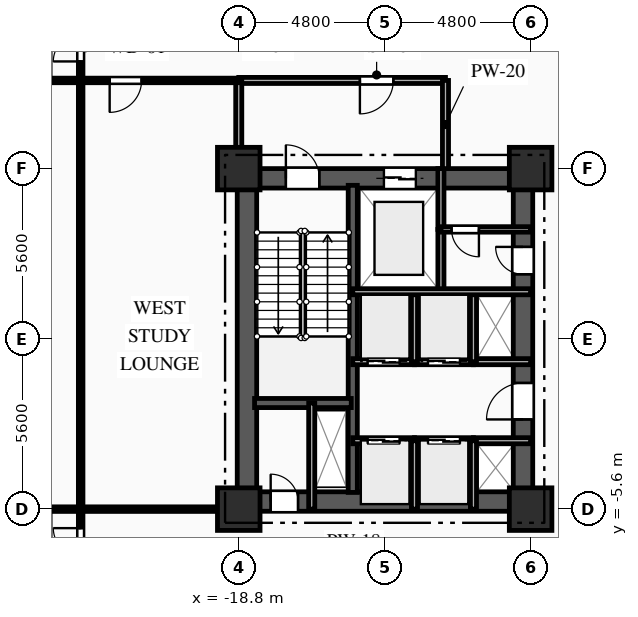
"""IFC4 building model, lengths in metres.
Left out: names, types, materials, properties, quantities, classifications, styles, units other than length and angle.
Written with IfcOpenShell. Run it as: python <this file> out.ifc"""

import sys

from ifc_helpers import new_model, si_unit, direction, frame, frame_2d, origin, origin_2d, place, context, subcontext, project, spatial, rectangle, extrude, element, fill, save


model = new_model("IFC4")
c1 = context("Model", 3, precision=1e-05, world=origin(), true_north=direction((0.0, 1.0)))
c2 = subcontext(c1, "Body", "Model", "MODEL_VIEW")
j1 = project(units=[si_unit("LENGTHUNIT", "METRE"), si_unit("PLANEANGLEUNIT", "RADIAN")], contexts=[c1])
p1 = place(None, origin())
s1 = spatial("IfcSite", under=j1, at=p1, CompositionType="ELEMENT")
p2 = place(p1, origin())
s2 = spatial("IfcBuilding", under=s1, at=p2, CompositionType="ELEMENT")
p3 = place(p2, frame((0.0, 0.0, 18.0)))
s3 = spatial("IfcBuildingStorey", under=s2, at=p3, CompositionType="ELEMENT", Elevation=18.0)
for number, where, z_axis, x_axis in (
    (1, (-18.8, -5.6, 0.0), (0.0, 0.0, 1.0), (1.0, 0.0, 0.0)),
    (2, (-18.8, 5.6, 0.0), (0.0, 0.0, 1.0), (1.0, 0.0, 0.0)),
    (3, (-9.2, -5.6, 0.0), (0.0, 0.0, 1.0), (1.0, 0.0, 0.0)),
    (4, (-9.2, 5.6, 0.0), (0.0, 0.0, 1.0), (1.0, 0.0, 0.0)),
):
    element("IfcColumn", number, at=place(p3, frame(where, z_axis=z_axis, x_axis=x_axis)), inside=s3, PredefinedType="COLUMN", context=c2, shape_type="SweptSolid", body=[
        extrude(rectangle(XDim=1.4, YDim=1.4, at=origin_2d()), origin(), (0.0, 0.0, 1.0), 4.5),
    ])
p4 = place(p3, frame((-18.8, 5.28, 0.0), z_axis=(0.0, 0.0, 1.0), x_axis=(1.0, 0.0, 0.0)))
e5 = element("IfcWall", 5, at=p4, inside=s3, PredefinedType="SHEAR", context=c2, shape_type="SweptSolid", body=[
    extrude(rectangle(XDim=9.6, YDim=0.64, at=frame_2d((4.8, 0.0))), origin(), (0.0, 0.0, 1.0), 4.17),
])
p5 = place(p4, frame((1.55, 0.0, 0.0)))
e6 = element("IfcOpeningElement", 6, at=p5, cuts=e5, PredefinedType="OPENING", context=c2, shape_type="SweptSolid", body=[
    extrude(rectangle(XDim=1.1, YDim=2.15, at=frame_2d((0.55, 1.075))), frame((0.0, 0.33, 0.0), z_axis=(0.0, -1.0, 0.0), x_axis=(1.0, 0.0, 0.0)), (0.0, 0.0, 1.0), 0.66),
])
p6 = place(p4, frame((4.775, 0.0, 0.0)))
e7 = element("IfcOpeningElement", 7, at=p6, cuts=e5, PredefinedType="OPENING", context=c2, shape_type="SweptSolid", body=[
    extrude(rectangle(XDim=1.05, YDim=2.1, at=frame_2d((0.525, 1.05))), frame((0.0, 0.33, 0.0), z_axis=(0.0, -1.0, 0.0), x_axis=(1.0, 0.0, 0.0)), (0.0, 0.0, 1.0), 0.66),
])
p7 = place(p3, frame((-18.8, -5.35, 0.0), z_axis=(0.0, 0.0, 1.0), x_axis=(1.0, 0.0, 0.0)))
e8 = element("IfcWall", 8, at=p7, inside=s3, PredefinedType="SHEAR", context=c2, shape_type="SweptSolid", body=[
    extrude(rectangle(XDim=9.6, YDim=0.64, at=frame_2d((4.8, 0.0))), origin(), (0.0, 0.0, 1.0), 4.17),
])
p8 = place(p7, frame((1.05, 0.0, 0.0)))
e9 = element("IfcOpeningElement", 9, at=p8, cuts=e8, PredefinedType="OPENING", context=c2, shape_type="SweptSolid", body=[
    extrude(rectangle(XDim=0.9, YDim=2.1, at=frame_2d((0.45, 1.05))), frame((0.0, 0.33, 0.0), z_axis=(0.0, -1.0, 0.0), x_axis=(1.0, 0.0, 0.0)), (0.0, 0.0, 1.0), 0.66),
])
p9 = place(p3, frame((-18.53, -5.05, 0.0), z_axis=(0.0, 0.0, 1.0), x_axis=(0.0, 1.0, 0.0)))
e10 = element("IfcWall", 10, at=p9, inside=s3, PredefinedType="SHEAR", context=c2, shape_type="SweptSolid", body=[
    extrude(rectangle(XDim=10.1, YDim=0.64, at=frame_2d((5.05, 0.0))), origin(), (0.0, 0.0, 1.0), 4.17),
])
p10 = place(p3, frame((-9.45, -5.05, 0.0), z_axis=(0.0, 0.0, 1.0), x_axis=(0.0, 1.0, 0.0)))
e11 = element("IfcWall", 11, at=p10, inside=s3, PredefinedType="SHEAR", context=c2, shape_type="SweptSolid", body=[
    extrude(rectangle(XDim=10.1, YDim=0.64, at=frame_2d((5.05, 0.0))), origin(), (0.0, 0.0, 1.0), 4.17),
])
p11 = place(p10, frame((7.175, 0.0, 0.0)))
e12 = element("IfcOpeningElement", 12, at=p11, cuts=e11, PredefinedType="OPENING", context=c2, shape_type="SweptSolid", body=[
    extrude(rectangle(XDim=0.9, YDim=2.1, at=frame_2d((0.45, 1.05))), frame((0.0, 0.33, 0.0), z_axis=(0.0, -1.0, 0.0), x_axis=(1.0, 0.0, 0.0)), (0.0, 0.0, 1.0), 0.66),
])
p12 = place(p10, frame((2.4, 0.0, 0.0)))
e13 = element("IfcOpeningElement", 13, at=p12, cuts=e11, PredefinedType="OPENING", context=c2, shape_type="SweptSolid", body=[
    extrude(rectangle(XDim=1.2, YDim=2.15, at=frame_2d((0.6, 1.075))), frame((0.0, 0.33, 0.0), z_axis=(0.0, -1.0, 0.0), x_axis=(1.0, 0.0, 0.0)), (0.0, 0.0, 1.0), 0.66),
])
p13 = place(p3, frame((-15.05, -5.05, 0.0), z_axis=(0.0, 0.0, 1.0), x_axis=(0.0, 1.0, 0.0)))
e14 = element("IfcWall", 14, at=p13, inside=s3, PredefinedType="SHEAR", context=c2, shape_type="SweptSolid", body=[
    extrude(rectangle(XDim=10.1, YDim=0.3, at=frame_2d((5.05, 0.0))), origin(), (0.0, 0.0, 1.0), 4.17),
])
p14 = place(p3, frame((-18.28, -2.11, 0.0), z_axis=(0.0, 0.0, 1.0), x_axis=(1.0, 0.0, 0.0)))
e15 = element("IfcWall", 15, at=p14, inside=s3, PredefinedType="SHEAR", context=c2, shape_type="SweptSolid", body=[
    extrude(rectangle(XDim=3.18, YDim=0.3, at=frame_2d((1.59, 0.0))), origin(), (0.0, 0.0, 1.0), 4.17),
])
p15 = place(p3, frame((-16.4, -5.6, 0.0), z_axis=(0.0, 0.0, 1.0), x_axis=(0.0, 1.0, 0.0)))
e16 = element("IfcWall", 16, at=p15, inside=s3, PredefinedType="PARTITIONING", context=c2, shape_type="SweptSolid", body=[
    extrude(rectangle(XDim=3.49, YDim=0.2, at=frame_2d((1.745, 0.0))), origin(), (0.0, 0.0, 1.0), 4.17),
])
p16 = place(p3, frame((-12.15, 1.55, 0.0), z_axis=(0.0, 0.0, 1.0), x_axis=(0.0, 1.0, 0.0)))
e17 = element("IfcWall", 17, at=p16, inside=s3, PredefinedType="PARTITIONING", context=c2, shape_type="SweptSolid", body=[
    extrude(rectangle(XDim=2.05, YDim=0.2, at=frame_2d((1.025, 0.0))), origin(), (0.0, 0.0, 1.0), 4.17),
])
p17 = place(p3, frame((-12.15, 3.6, 0.0), z_axis=(0.0, 0.0, 1.0), x_axis=(0.0, 1.0, 0.0)))
e18 = element("IfcWall", 18, at=p17, inside=s3, PredefinedType="PARTITIONING", context=c2, shape_type="SweptSolid", body=[
    extrude(rectangle(XDim=2.0, YDim=0.2, at=frame_2d((1.0, 0.0))), origin(), (0.0, 0.0, 1.0), 4.17),
])
p18 = place(p3, frame((-12.0, 8.5, 0.0), z_axis=(0.0, 0.0, 1.0), x_axis=(-1.0, 0.0, 0.0)))
e19 = element("IfcWall", 19, at=p18, inside=s3, PredefinedType="PARTITIONING", context=c2, shape_type="SweptSolid", body=[
    extrude(rectangle(XDim=6.8, YDim=0.2, at=frame_2d((3.4, 0.0))), origin(), (0.0, 0.0, 1.0), 4.17),
])
p19 = place(p18, frame((1.715, 0.0, 0.0)))
e20 = element("IfcOpeningElement", 20, at=p19, cuts=e19, PredefinedType="OPENING", context=c2, shape_type="SweptSolid", body=[
    extrude(rectangle(XDim=1.1, YDim=2.15, at=frame_2d((0.55, 1.075))), frame((0.0, 0.11, 0.0), z_axis=(0.0, -1.0, 0.0), x_axis=(1.0, 0.0, 0.0)), (0.0, 0.0, 1.0), 0.22),
])
p20 = place(p3, frame((-12.0, 5.6, 0.0), z_axis=(0.0, 0.0, 1.0), x_axis=(0.0, 1.0, 0.0)))
e21 = element("IfcWall", 21, at=p20, inside=s3, PredefinedType="PARTITIONING", context=c2, shape_type="SweptSolid", body=[
    extrude(rectangle(XDim=2.9, YDim=0.2, at=frame_2d((1.45, 0.0))), origin(), (0.0, 0.0, 1.0), 4.17),
])
p21 = place(p3, frame((-18.8, 8.5, 0.0), z_axis=(0.0, 0.0, 1.0), x_axis=(0.0, -1.0, 0.0)))
e22 = element("IfcWall", 22, at=p21, inside=s3, PredefinedType="PARTITIONING", context=c2, shape_type="SweptSolid", body=[
    extrude(rectangle(XDim=2.9, YDim=0.2, at=frame_2d((1.45, 0.0))), origin(), (0.0, 0.0, 1.0), 3.655),
])
p22 = place(p3, frame((-9.2, 3.6, 0.0), z_axis=(0.0, 0.0, 1.0), x_axis=(-1.0, 0.0, 0.0)))
e23 = element("IfcWall", 23, at=p22, inside=s3, PredefinedType="PARTITIONING", context=c2, shape_type="SweptSolid", body=[
    extrude(rectangle(XDim=2.95, YDim=0.18, at=frame_2d((1.475, 0.0))), origin(), (0.0, 0.0, 1.0), 4.17),
])
p23 = place(p22, frame((1.7, 0.0, 0.0)))
e24 = element("IfcOpeningElement", 24, at=p23, cuts=e23, PredefinedType="OPENING", context=c2, shape_type="SweptSolid", body=[
    extrude(rectangle(XDim=0.9, YDim=2.1, at=frame_2d((0.45, 1.05))), frame((0.0, 0.1, 0.0), z_axis=(0.0, -1.0, 0.0), x_axis=(1.0, 0.0, 0.0)), (0.0, 0.0, 1.0), 0.2),
])
p24 = place(p3, frame((-15.05, -3.35, 0.0), z_axis=(0.0, 0.0, 1.0), x_axis=(1.0, 0.0, 0.0)))
e25 = element("IfcWall", 25, at=p24, inside=s3, PredefinedType="PARTITIONING", context=c2, shape_type="SweptSolid", body=[
    extrude(rectangle(XDim=2.03, YDim=0.2, at=frame_2d((1.015, 0.0))), origin(), (0.0, 0.0, 1.0), 4.17),
])
p25 = place(p24, frame((0.49, 0.0, 0.0)))
e26 = element("IfcOpeningElement", 26, at=p25, cuts=e25, PredefinedType="OPENING", context=c2, shape_type="SweptSolid", body=[
    extrude(rectangle(XDim=1.05, YDim=2.1, at=frame_2d((0.525, 1.05))), frame((0.0, 0.11, 0.0), z_axis=(0.0, -1.0, 0.0), x_axis=(1.0, 0.0, 0.0)), (0.0, 0.0, 1.0), 0.22),
])
p26 = place(p3, frame((-13.02, -3.35, 0.0), z_axis=(0.0, 0.0, 1.0), x_axis=(1.0, 0.0, 0.0)))
e27 = element("IfcWall", 27, at=p26, inside=s3, PredefinedType="PARTITIONING", context=c2, shape_type="SweptSolid", body=[
    extrude(rectangle(XDim=1.94, YDim=0.2, at=frame_2d((0.97, 0.0))), origin(), (0.0, 0.0, 1.0), 4.17),
])
p27 = place(p26, frame((0.445, 0.0, 0.0)))
e28 = element("IfcOpeningElement", 28, at=p27, cuts=e27, PredefinedType="OPENING", context=c2, shape_type="SweptSolid", body=[
    extrude(rectangle(XDim=1.05, YDim=2.1, at=frame_2d((0.525, 1.05))), frame((0.0, 0.11, 0.0), z_axis=(0.0, -1.0, 0.0), x_axis=(1.0, 0.0, 0.0)), (0.0, 0.0, 1.0), 0.22),
])
p28 = place(p3, frame((-11.08, -3.35, 0.0), z_axis=(0.0, 0.0, 1.0), x_axis=(1.0, 0.0, 0.0)))
e29 = element("IfcWall", 29, at=p28, inside=s3, PredefinedType="PARTITIONING", context=c2, shape_type="SweptSolid", body=[
    extrude(rectangle(XDim=1.88, YDim=0.2, at=frame_2d((0.94, 0.0))), origin(), (0.0, 0.0, 1.0), 3.885),
])
p29 = place(p3, frame((-13.02, -0.75, 0.0), z_axis=(0.0, 0.0, 1.0), x_axis=(-1.0, 0.0, 0.0)))
e30 = element("IfcWall", 30, at=p29, inside=s3, PredefinedType="PARTITIONING", context=c2, shape_type="SweptSolid", body=[
    extrude(rectangle(XDim=2.03, YDim=0.2, at=frame_2d((1.015, 0.0))), origin(), (0.0, 0.0, 1.0), 4.17),
])
p30 = place(p29, frame((0.49, 0.0, 0.0)))
e31 = element("IfcOpeningElement", 31, at=p30, cuts=e30, PredefinedType="OPENING", context=c2, shape_type="SweptSolid", body=[
    extrude(rectangle(XDim=1.05, YDim=2.1, at=frame_2d((0.525, 1.05))), frame((0.0, 0.11, 0.0), z_axis=(0.0, -1.0, 0.0), x_axis=(1.0, 0.0, 0.0)), (0.0, 0.0, 1.0), 0.22),
])
p31 = place(p3, frame((-11.08, -0.75, 0.0), z_axis=(0.0, 0.0, 1.0), x_axis=(-1.0, 0.0, 0.0)))
e32 = element("IfcWall", 32, at=p31, inside=s3, PredefinedType="PARTITIONING", context=c2, shape_type="SweptSolid", body=[
    extrude(rectangle(XDim=1.94, YDim=0.2, at=frame_2d((0.97, 0.0))), origin(), (0.0, 0.0, 1.0), 4.17),
])
p32 = place(p31, frame((0.445, 0.0, 0.0)))
e33 = element("IfcOpeningElement", 33, at=p32, cuts=e32, PredefinedType="OPENING", context=c2, shape_type="SweptSolid", body=[
    extrude(rectangle(XDim=1.05, YDim=2.1, at=frame_2d((0.525, 1.05))), frame((0.0, 0.11, 0.0), z_axis=(0.0, -1.0, 0.0), x_axis=(1.0, 0.0, 0.0)), (0.0, 0.0, 1.0), 0.22),
])
p33 = place(p3, frame((-9.2, -0.75, 0.0), z_axis=(0.0, 0.0, 1.0), x_axis=(-1.0, 0.0, 0.0)))
e34 = element("IfcWall", 34, at=p33, inside=s3, PredefinedType="PARTITIONING", context=c2, shape_type="SweptSolid", body=[
    extrude(rectangle(XDim=1.88, YDim=0.2, at=frame_2d((0.94, 0.0))), origin(), (0.0, 0.0, 1.0), 4.17),
])
for number, where, z_axis, x_axis in (
    (35, (-13.02, -5.6, 0.0), (0.0, 0.0, 1.0), (0.0, 1.0, 0.0)),
    (36, (-11.08, -5.6, 0.0), (0.0, 0.0, 1.0), (0.0, 1.0, 0.0)),
):
    element("IfcWall", number, at=place(p3, frame(where, z_axis=z_axis, x_axis=x_axis)), inside=s3, PredefinedType="PARTITIONING", context=c2, shape_type="SweptSolid", body=[
        extrude(rectangle(XDim=2.25, YDim=0.2, at=frame_2d((1.125, 0.0))), origin(), (0.0, 0.0, 1.0), 4.17),
    ])
for number, where, z_axis, x_axis in (
    (37, (-13.02, -0.75, 0.0), (0.0, 0.0, 1.0), (0.0, 1.0, 0.0)),
    (38, (-11.08, -0.75, 0.0), (0.0, 0.0, 1.0), (0.0, 1.0, 0.0)),
):
    element("IfcWall", number, at=place(p3, frame(where, z_axis=z_axis, x_axis=x_axis)), inside=s3, PredefinedType="PARTITIONING", context=c2, shape_type="SweptSolid", body=[
        extrude(rectangle(XDim=2.3, YDim=0.2, at=frame_2d((1.15, 0.0))), origin(), (0.0, 0.0, 1.0), 4.17),
    ])
p34 = place(p3, frame((-24.0, 8.5, 0.0), z_axis=(0.0, 0.0, 1.0), x_axis=(0.0, 1.0, 0.0)))
e39 = element("IfcWall", 39, at=p34, inside=s3, PredefinedType="PARTITIONING", context=c2, shape_type="SweptSolid", body=[
    extrude(rectangle(XDim=2.15, YDim=0.15, at=frame_2d((1.075, 0.0))), origin(), (0.0, 0.0, 1.0), 4.17),
])
p35 = place(p34, frame((0.625, 0.0, 0.0)))
e40 = element("IfcOpeningElement", 40, at=p35, cuts=e39, PredefinedType="OPENING", context=c2, shape_type="SweptSolid", body=[
    extrude(rectangle(XDim=0.9, YDim=2.1, at=frame_2d((0.45, 1.05))), frame((0.0, 0.085, 0.0), z_axis=(0.0, -1.0, 0.0), x_axis=(1.0, 0.0, 0.0)), (0.0, 0.0, 1.0), 0.17),
])
p36 = place(p3, frame((-18.8, 8.5, 0.0), z_axis=(0.0, 0.0, 1.0), x_axis=(-1.0, 0.0, 0.0)))
e41 = element("IfcWall", 41, at=p36, inside=s3, PredefinedType="PARTITIONING", context=c2, shape_type="SweptSolid", body=[
    extrude(rectangle(XDim=5.2, YDim=0.15, at=frame_2d((2.6, 0.0))), origin(), (0.0, 0.0, 1.0), 4.17),
])
p37 = place(p36, frame((3.196, 0.0, 0.0)))
e42 = element("IfcOpeningElement", 42, at=p37, cuts=e41, PredefinedType="OPENING", context=c2, shape_type="SweptSolid", body=[
    extrude(rectangle(XDim=1.05, YDim=2.15, at=frame_2d((0.525, 1.075))), frame((0.0, 0.085, 0.0), z_axis=(0.0, -1.0, 0.0), x_axis=(1.0, 0.0, 0.0)), (0.0, 0.0, 1.0), 0.17),
])
p38 = place(p3, frame((-24.0, -7.75, 0.0), z_axis=(0.0, 0.0, 1.0), x_axis=(0.0, 1.0, 0.0)))
e43 = element("IfcWall", 43, at=p38, inside=s3, PredefinedType="PARTITIONING", context=c2, shape_type="SweptSolid", body=[
    extrude(rectangle(XDim=2.15, YDim=0.15, at=frame_2d((1.075, 0.0))), origin(), (0.0, 0.0, 1.0), 4.17),
])
p39 = place(p38, frame((0.625, 0.0, 0.0)))
e44 = element("IfcOpeningElement", 44, at=p39, cuts=e43, PredefinedType="OPENING", context=c2, shape_type="SweptSolid", body=[
    extrude(rectangle(XDim=0.9, YDim=2.1, at=frame_2d((0.45, 1.05))), frame((0.0, 0.085, 0.0), z_axis=(0.0, -1.0, 0.0), x_axis=(1.0, 0.0, 0.0)), (0.0, 0.0, 1.0), 0.17),
])
p40 = place(p3, frame((-24.0, -5.6, 0.0), z_axis=(0.0, 0.0, 1.0), x_axis=(1.0, 0.0, 0.0)))
e45 = element("IfcWall", 45, at=p40, inside=s3, PredefinedType="PARTITIONING", context=c2, shape_type="SweptSolid", body=[
    extrude(rectangle(XDim=5.2, YDim=0.15, at=frame_2d((2.6, 0.0))), origin(), (0.0, 0.0, 1.0), 4.17),
])
p41 = place(p3, frame((-26.65, 8.5, 0.0), z_axis=(0.0, 0.0, 1.0), x_axis=(1.0, 0.0, 0.0)))
e46 = element("IfcWall", 46, at=p41, inside=s3, PredefinedType="PARTITIONING", context=c2, shape_type="SweptSolid", body=[
    extrude(rectangle(XDim=2.65, YDim=0.15, at=frame_2d((1.325, 0.0))), origin(), (0.0, 0.0, 1.0), 4.17),
])
p42 = place(p41, frame((0.635, 0.0, 0.0)))
e47 = element("IfcOpeningElement", 47, at=p42, cuts=e46, PredefinedType="OPENING", context=c2, shape_type="SweptSolid", body=[
    extrude(rectangle(XDim=1.05, YDim=2.15, at=frame_2d((0.525, 1.075))), frame((0.0, 0.085, 0.0), z_axis=(0.0, -1.0, 0.0), x_axis=(1.0, 0.0, 0.0)), (0.0, 0.0, 1.0), 0.17),
])
p43 = place(p3, frame((-24.0, -5.6, 0.0), z_axis=(0.0, 0.0, 1.0), x_axis=(-1.0, 0.0, 0.0)))
e48 = element("IfcWall", 48, at=p43, inside=s3, PredefinedType="PARTITIONING", context=c2, shape_type="SweptSolid", body=[
    extrude(rectangle(XDim=2.65, YDim=0.15, at=frame_2d((1.325, 0.0))), origin(), (0.0, 0.0, 1.0), 4.17),
])
p44 = place(p43, frame((0.965, 0.0, 0.0)))
e49 = element("IfcOpeningElement", 49, at=p44, cuts=e48, PredefinedType="OPENING", context=c2, shape_type="SweptSolid", body=[
    extrude(rectangle(XDim=1.05, YDim=2.15, at=frame_2d((0.525, 1.075))), frame((0.0, 0.085, 0.0), z_axis=(0.0, -1.0, 0.0), x_axis=(1.0, 0.0, 0.0)), (0.0, 0.0, 1.0), 0.17),
])
p45 = place(p3, frame((-24.0, 8.5, 0.0), z_axis=(0.0, 0.0, 1.0), x_axis=(0.0, -1.0, 0.0)))
e50 = element("IfcWall", 50, at=p45, inside=s3, PredefinedType="PARTITIONING", context=c2, shape_type="SweptSolid", body=[
    extrude(rectangle(XDim=14.1, YDim=0.15, at=frame_2d((7.05, 0.0))), origin(), (0.0, 0.0, 1.0), 4.17),
])
p46 = place(p3, frame((-15.05, 1.55, 0.0), z_axis=(0.0, 0.0, 1.0), x_axis=(1.0, 0.0, 0.0)))
e51 = element("IfcWall", 51, at=p46, inside=s3, PredefinedType="PARTITIONING", context=c2, shape_type="SweptSolid", body=[
    extrude(rectangle(XDim=5.85, YDim=0.2, at=frame_2d((2.925, 0.0))), origin(), (0.0, 0.0, 1.0), 4.17),
])
p47 = place(p5, origin())
e52 = element("IfcDoor", 52, at=p47, inside=s3, OperationType="SINGLE_SWING_LEFT", PredefinedType="DOOR", context=c2, shape_type="SweptSolid", body=[
    extrude(rectangle(XDim=1.1, YDim=2.15, at=frame_2d((0.55, 1.075))), frame((0.0, 0.025, 0.0), z_axis=(0.0, -1.0, 0.0), x_axis=(1.0, 0.0, 0.0)), (0.0, 0.0, 1.0), 0.05),
])
fill(e6, e52)
p48 = place(p6, origin())
e53 = element("IfcDoor", 53, at=p48, inside=s3, OperationType="DOUBLE_DOOR_SLIDING", PredefinedType="DOOR", context=c2, shape_type="SweptSolid", body=[
    extrude(rectangle(XDim=1.05, YDim=2.1, at=frame_2d((0.525, 1.05))), frame((0.0, 0.025, 0.0), z_axis=(0.0, -1.0, 0.0), x_axis=(1.0, 0.0, 0.0)), (0.0, 0.0, 1.0), 0.05),
])
fill(e7, e53)
p49 = place(p8, origin())
e54 = element("IfcDoor", 54, at=p49, inside=s3, OperationType="SINGLE_SWING_LEFT", PredefinedType="DOOR", context=c2, shape_type="SweptSolid", body=[
    extrude(rectangle(XDim=0.9, YDim=2.1, at=frame_2d((0.45, 1.05))), frame((0.0, 0.025, 0.0), z_axis=(0.0, -1.0, 0.0), x_axis=(1.0, 0.0, 0.0)), (0.0, 0.0, 1.0), 0.05),
])
fill(e9, e54)
p50 = place(p19, origin())
e55 = element("IfcDoor", 55, at=p50, inside=s3, OperationType="SINGLE_SWING_RIGHT", PredefinedType="DOOR", context=c2, shape_type="SweptSolid", body=[
    extrude(rectangle(XDim=1.1, YDim=2.15, at=frame_2d((0.55, 1.075))), frame((0.0, 0.025, 0.0), z_axis=(0.0, -1.0, 0.0), x_axis=(1.0, 0.0, 0.0)), (0.0, 0.0, 1.0), 0.05),
])
fill(e20, e55)
p51 = place(p23, origin())
e56 = element("IfcDoor", 56, at=p51, inside=s3, OperationType="SINGLE_SWING_LEFT", PredefinedType="DOOR", context=c2, shape_type="SweptSolid", body=[
    extrude(rectangle(XDim=0.9, YDim=2.1, at=frame_2d((0.45, 1.05))), frame((0.0, 0.025, 0.0), z_axis=(0.0, -1.0, 0.0), x_axis=(1.0, 0.0, 0.0)), (0.0, 0.0, 1.0), 0.05),
])
fill(e24, e56)
p52 = place(p11, origin())
e57 = element("IfcDoor", 57, at=p52, inside=s3, OperationType="SINGLE_SWING_RIGHT", PredefinedType="DOOR", context=c2, shape_type="SweptSolid", body=[
    extrude(rectangle(XDim=0.9, YDim=2.1, at=frame_2d((0.45, 1.05))), frame((0.0, 0.025, 0.0), z_axis=(0.0, -1.0, 0.0), x_axis=(1.0, 0.0, 0.0)), (0.0, 0.0, 1.0), 0.05),
])
fill(e12, e57)
p53 = place(p25, origin())
e58 = element("IfcDoor", 58, at=p53, inside=s3, OperationType="DOUBLE_DOOR_SLIDING", PredefinedType="DOOR", context=c2, shape_type="SweptSolid", body=[
    extrude(rectangle(XDim=1.05, YDim=2.1, at=frame_2d((0.525, 1.05))), frame((0.0, 0.025, 0.0), z_axis=(0.0, -1.0, 0.0), x_axis=(1.0, 0.0, 0.0)), (0.0, 0.0, 1.0), 0.05),
])
fill(e26, e58)
p54 = place(p27, origin())
e59 = element("IfcDoor", 59, at=p54, inside=s3, OperationType="DOUBLE_DOOR_SLIDING", PredefinedType="DOOR", context=c2, shape_type="SweptSolid", body=[
    extrude(rectangle(XDim=1.05, YDim=2.1, at=frame_2d((0.525, 1.05))), frame((0.0, 0.025, 0.0), z_axis=(0.0, -1.0, 0.0), x_axis=(1.0, 0.0, 0.0)), (0.0, 0.0, 1.0), 0.05),
])
fill(e28, e59)
p55 = place(p30, origin())
e60 = element("IfcDoor", 60, at=p55, inside=s3, OperationType="DOUBLE_DOOR_SLIDING", PredefinedType="DOOR", context=c2, shape_type="SweptSolid", body=[
    extrude(rectangle(XDim=1.05, YDim=2.1, at=frame_2d((0.525, 1.05))), frame((0.0, 0.025, 0.0), z_axis=(0.0, -1.0, 0.0), x_axis=(1.0, 0.0, 0.0)), (0.0, 0.0, 1.0), 0.05),
])
fill(e31, e60)
p56 = place(p32, origin())
e61 = element("IfcDoor", 61, at=p56, inside=s3, OperationType="DOUBLE_DOOR_SLIDING", PredefinedType="DOOR", context=c2, shape_type="SweptSolid", body=[
    extrude(rectangle(XDim=1.05, YDim=2.1, at=frame_2d((0.525, 1.05))), frame((0.0, 0.025, 0.0), z_axis=(0.0, -1.0, 0.0), x_axis=(1.0, 0.0, 0.0)), (0.0, 0.0, 1.0), 0.05),
])
fill(e33, e61)
p57 = place(p12, origin())
e62 = element("IfcDoor", 62, at=p57, inside=s3, OperationType="SINGLE_SWING_LEFT", PredefinedType="DOOR", context=c2, shape_type="SweptSolid", body=[
    extrude(rectangle(XDim=1.2, YDim=2.15, at=frame_2d((0.6, 1.075))), frame((0.0, 0.025, 0.0), z_axis=(0.0, -1.0, 0.0), x_axis=(1.0, 0.0, 0.0)), (0.0, 0.0, 1.0), 0.05),
])
fill(e13, e62)
p58 = place(p35, origin())
e63 = element("IfcDoor", 63, at=p58, inside=s3, OperationType="SINGLE_SWING_LEFT", PredefinedType="DOOR", context=c2, shape_type="SweptSolid", body=[
    extrude(rectangle(XDim=0.9, YDim=2.1, at=frame_2d((0.45, 1.05))), frame((0.0, 0.025, 0.0), z_axis=(0.0, -1.0, 0.0), x_axis=(1.0, 0.0, 0.0)), (0.0, 0.0, 1.0), 0.05),
])
fill(e40, e63)
p59 = place(p37, origin())
e64 = element("IfcDoor", 64, at=p59, inside=s3, OperationType="SINGLE_SWING_RIGHT", PredefinedType="DOOR", context=c2, shape_type="SweptSolid", body=[
    extrude(rectangle(XDim=1.05, YDim=2.15, at=frame_2d((0.525, 1.075))), frame((0.0, 0.025, 0.0), z_axis=(0.0, -1.0, 0.0), x_axis=(1.0, 0.0, 0.0)), (0.0, 0.0, 1.0), 0.05),
])
fill(e42, e64)
p60 = place(p39, origin())
e65 = element("IfcDoor", 65, at=p60, inside=s3, OperationType="SINGLE_SWING_RIGHT", PredefinedType="DOOR", context=c2, shape_type="SweptSolid", body=[
    extrude(rectangle(XDim=0.9, YDim=2.1, at=frame_2d((0.45, 1.05))), frame((0.0, 0.025, 0.0), z_axis=(0.0, -1.0, 0.0), x_axis=(1.0, 0.0, 0.0)), (0.0, 0.0, 1.0), 0.05),
])
fill(e44, e65)
save(model, sys.argv[1])
